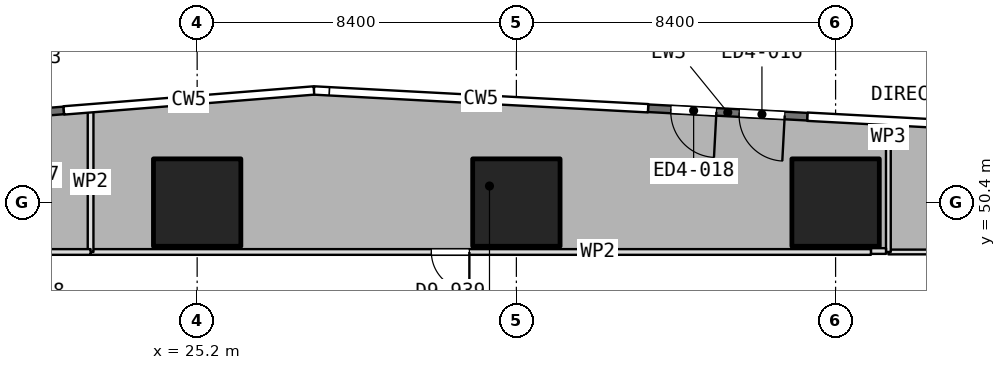
"""IFC4 building model, lengths in metres.
Left out: names, types, materials, properties, quantities, classifications, styles, units other than length and angle.
Written with IfcOpenShell. Run it as: python <this file> out.ifc"""

import sys

from ifc_helpers import new_model, si_unit, direction, frame, frame_2d, origin, origin_2d, place, context, subcontext, project, spatial, rectangle, extrude, element, fill, save


model = new_model("IFC4")
c1 = context("Model", 3, precision=1e-05, world=origin(), true_north=direction((0.0, 1.0)))
c2 = subcontext(c1, "Body", "Model", "MODEL_VIEW")
j1 = project(units=[si_unit("LENGTHUNIT", "METRE"), si_unit("PLANEANGLEUNIT", "RADIAN")], contexts=[c1])
p1 = place(None, origin())
s1 = spatial("IfcSite", under=j1, at=p1, CompositionType="ELEMENT")
p2 = place(p1, origin())
s2 = spatial("IfcBuilding", under=s1, at=p2, CompositionType="ELEMENT")
p3 = place(p2, frame((0.0, 0.0, 245.6)))
s3 = spatial("IfcBuildingStorey", under=s2, at=p3, CompositionType="ELEMENT", Elevation=245.6)
for number, where, z_axis, x_axis in (
    (1, (25.2, 50.4, 0.0), (0.0, 0.0, 1.0), (1.0, 0.0, 0.0)),
    (2, (33.6, 50.4, 0.0), (0.0, 0.0, 1.0), (1.0, 0.0, 0.0)),
    (3, (42.0, 50.4, 0.0), (0.0, 0.0, 1.0), (1.0, 0.0, 0.0)),
):
    element("IfcColumn", number, at=place(p3, frame(where, z_axis=z_axis, x_axis=x_axis)), inside=s3, PredefinedType="COLUMN", context=c2, shape_type="SweptSolid", body=[
        extrude(rectangle(XDim=2.3, YDim=2.3, at=origin_2d()), origin(), (0.0, 0.0, 1.0), 4.5),
    ])
p4 = place(p3, frame((41.26, 52.659, 0.0), z_axis=(0.0, 0.0, 1.0), x_axis=(-0.998590720997, 0.053071385312, 0.0)))
e4 = element("IfcWall", 4, at=p4, inside=s3, PredefinedType="SOLIDWALL", context=c2, shape_type="SweptSolid", body=[
    extrude(rectangle(XDim=4.2, YDim=0.2, at=frame_2d((2.1, 0.0))), origin(), (0.0, 0.0, 1.0), 4.25),
])
p5 = place(p4, frame((0.6, 0.0, 0.0)))
e5 = element("IfcOpeningElement", 5, at=p5, cuts=e4, PredefinedType="OPENING", context=c2, shape_type="SweptSolid", body=[
    extrude(rectangle(XDim=1.2, YDim=2.4, at=frame_2d((0.6, 1.2))), frame((0.0, 0.11, 0.0), z_axis=(0.0, -1.0, 0.0), x_axis=(1.0, 0.0, 0.0)), (0.0, 0.0, 1.0), 0.22),
])
p6 = place(p4, frame((2.4, 0.0, 0.0)))
e6 = element("IfcOpeningElement", 6, at=p6, cuts=e4, PredefinedType="OPENING", context=c2, shape_type="SweptSolid", body=[
    extrude(rectangle(XDim=1.2, YDim=2.4, at=frame_2d((0.6, 1.2))), frame((0.0, 0.11, 0.0), z_axis=(0.0, -1.0, 0.0), x_axis=(1.0, 0.0, 0.0)), (0.0, 0.0, 1.0), 0.22),
])
p7 = place(p3, frame((21.691, 52.825, 0.0), z_axis=(0.0, 0.0, 1.0), x_axis=(-0.996837971736, -0.079461047721, 0.0)))
e7 = element("IfcWall", 7, at=p7, inside=s3, PredefinedType="SOLIDWALL", context=c2, shape_type="SweptSolid", body=[
    extrude(rectangle(XDim=4.2, YDim=0.2, at=frame_2d((2.1, 0.0))), origin(), (0.0, 0.0, 1.0), 4.25),
])
p8 = place(p7, frame((0.6, 0.0, 0.0)))
e8 = element("IfcOpeningElement", 8, at=p8, cuts=e7, PredefinedType="OPENING", context=c2, shape_type="SweptSolid", body=[
    extrude(rectangle(XDim=1.2, YDim=2.4, at=frame_2d((0.6, 1.2))), frame((0.0, 0.11, 0.0), z_axis=(0.0, -1.0, 0.0), x_axis=(1.0, 0.0, 0.0)), (0.0, 0.0, 1.0), 0.22),
])
p9 = place(p7, frame((2.4, 0.0, 0.0)))
e9 = element("IfcOpeningElement", 9, at=p9, cuts=e7, PredefinedType="OPENING", context=c2, shape_type="SweptSolid", body=[
    extrude(rectangle(XDim=1.2, YDim=2.4, at=frame_2d((0.6, 1.2))), frame((0.0, 0.11, 0.0), z_axis=(0.0, -1.0, 0.0), x_axis=(1.0, 0.0, 0.0)), (0.0, 0.0, 1.0), 0.22),
])
p10 = place(p3, frame((47.213, 49.1, 0.0), z_axis=(0.0, 0.0, 1.0), x_axis=(-1.0, 0.0, 0.0)))
e10 = element("IfcWall", 10, at=p10, inside=s3, PredefinedType="PARTITIONING", context=c2, shape_type="SweptSolid", body=[
    extrude(rectangle(XDim=3.824, YDim=0.125, at=frame_2d((1.912, 0.0))), origin(), (0.0, 0.0, 1.0), 4.25),
])
p11 = place(p10, frame((1.412, 0.0, 0.0)))
e11 = element("IfcOpeningElement", 11, at=p11, cuts=e10, PredefinedType="OPENING", context=c2, shape_type="SweptSolid", body=[
    extrude(rectangle(XDim=1.0, YDim=2.1, at=frame_2d((0.5, 1.05))), frame((0.0, 0.073, 0.0), z_axis=(0.0, -1.0, 0.0), x_axis=(1.0, 0.0, 0.0)), (0.0, 0.0, 1.0), 0.145),
])
p12 = place(p3, frame((43.389, 49.1, 0.0), z_axis=(0.0, 0.0, 1.0), x_axis=(0.0, 1.0, 0.0)))
e12 = element("IfcWall", 12, at=p12, inside=s3, PredefinedType="PARTITIONING", context=c2, shape_type="SweptSolid", body=[
    extrude(rectangle(XDim=3.366, YDim=0.125, at=frame_2d((1.683, 0.0))), origin(), (0.0, 0.0, 1.0), 4.25),
])
p13 = place(p3, frame((43.327, 49.125, 0.0), z_axis=(0.0, 0.0, 1.0), x_axis=(-1.0, 0.0, 0.0)))
e13 = element("IfcWall", 13, at=p13, inside=s3, PredefinedType="PARTITIONING", context=c2, shape_type="SweptSolid", body=[
    extrude(rectangle(XDim=0.397, YDim=0.15, at=frame_2d((0.198, 0.0))), origin(), (0.0, 0.0, 1.0), 4.25),
])
p14 = place(p3, frame((42.93, 49.1, 0.0), z_axis=(0.0, 0.0, 1.0), x_axis=(-1.0, 0.0, 0.0)))
e14 = element("IfcWall", 14, at=p14, inside=s3, PredefinedType="PARTITIONING", context=c2, shape_type="SweptSolid", body=[
    extrude(rectangle(XDim=20.534, YDim=0.15, at=frame_2d((10.267, 0.0))), origin(), (0.0, 0.0, 1.0), 4.25),
])
p15 = place(p14, frame((10.567, 0.0, 0.0)))
e15 = element("IfcOpeningElement", 15, at=p15, cuts=e14, PredefinedType="OPENING", context=c2, shape_type="SweptSolid", body=[
    extrude(rectangle(XDim=1.0, YDim=2.1, at=frame_2d((0.5, 1.05))), frame((0.0, 0.085, 0.0), z_axis=(0.0, -1.0, 0.0), x_axis=(1.0, 0.0, 0.0)), (0.0, 0.0, 1.0), 0.17),
])
p16 = place(p3, frame((22.396, 49.1, 0.0), z_axis=(0.0, 0.0, 1.0), x_axis=(0.0, 1.0, 0.0)))
e16 = element("IfcWall", 16, at=p16, inside=s3, PredefinedType="PARTITIONING", context=c2, shape_type="SweptSolid", body=[
    extrude(rectangle(XDim=3.701, YDim=0.15, at=frame_2d((1.851, 0.0))), origin(), (0.0, 0.0, 1.0), 4.25),
])
p17 = place(p3, frame((22.396, 49.1, 0.0), z_axis=(0.0, 0.0, 1.0), x_axis=(-1.0, 0.0, 0.0)))
e17 = element("IfcWall", 17, at=p17, inside=s3, PredefinedType="PARTITIONING", context=c2, shape_type="SweptSolid", body=[
    extrude(rectangle(XDim=3.196, YDim=0.15, at=frame_2d((1.598, 0.0))), origin(), (0.0, 0.0, 1.0), 4.25),
])
p18 = place(p17, frame((1.098, 0.0, 0.0)))
e18 = element("IfcOpeningElement", 18, at=p18, cuts=e17, PredefinedType="OPENING", context=c2, shape_type="SweptSolid", body=[
    extrude(rectangle(XDim=1.0, YDim=2.1, at=frame_2d((0.5, 1.05))), frame((0.0, 0.085, 0.0), z_axis=(0.0, -1.0, 0.0), x_axis=(1.0, 0.0, 0.0)), (0.0, 0.0, 1.0), 0.17),
])
p19 = place(p5, origin())
e19 = element("IfcDoor", 19, at=p19, inside=s3, OperationType="SINGLE_SWING_LEFT", PredefinedType="DOOR", context=c2, shape_type="SweptSolid", body=[
    extrude(rectangle(XDim=1.2, YDim=2.4, at=frame_2d((0.6, 1.2))), frame((0.0, 0.025, 0.0), z_axis=(0.0, -1.0, 0.0), x_axis=(1.0, 0.0, 0.0)), (0.0, 0.0, 1.0), 0.05),
])
fill(e5, e19)
p20 = place(p6, origin())
e20 = element("IfcDoor", 20, at=p20, inside=s3, OperationType="SINGLE_SWING_LEFT", PredefinedType="DOOR", context=c2, shape_type="SweptSolid", body=[
    extrude(rectangle(XDim=1.2, YDim=2.4, at=frame_2d((0.6, 1.2))), frame((0.0, 0.025, 0.0), z_axis=(0.0, -1.0, 0.0), x_axis=(1.0, 0.0, 0.0)), (0.0, 0.0, 1.0), 0.05),
])
fill(e6, e20)
p21 = place(p15, origin())
e21 = element("IfcDoor", 21, at=p21, inside=s3, OperationType="SINGLE_SWING_LEFT", PredefinedType="DOOR", context=c2, shape_type="SweptSolid", body=[
    extrude(rectangle(XDim=1.0, YDim=2.1, at=frame_2d((0.5, 1.05))), frame((0.0, 0.025, 0.0), z_axis=(0.0, -1.0, 0.0), x_axis=(1.0, 0.0, 0.0)), (0.0, 0.0, 1.0), 0.05),
])
fill(e15, e21)
save(model, sys.argv[1])
